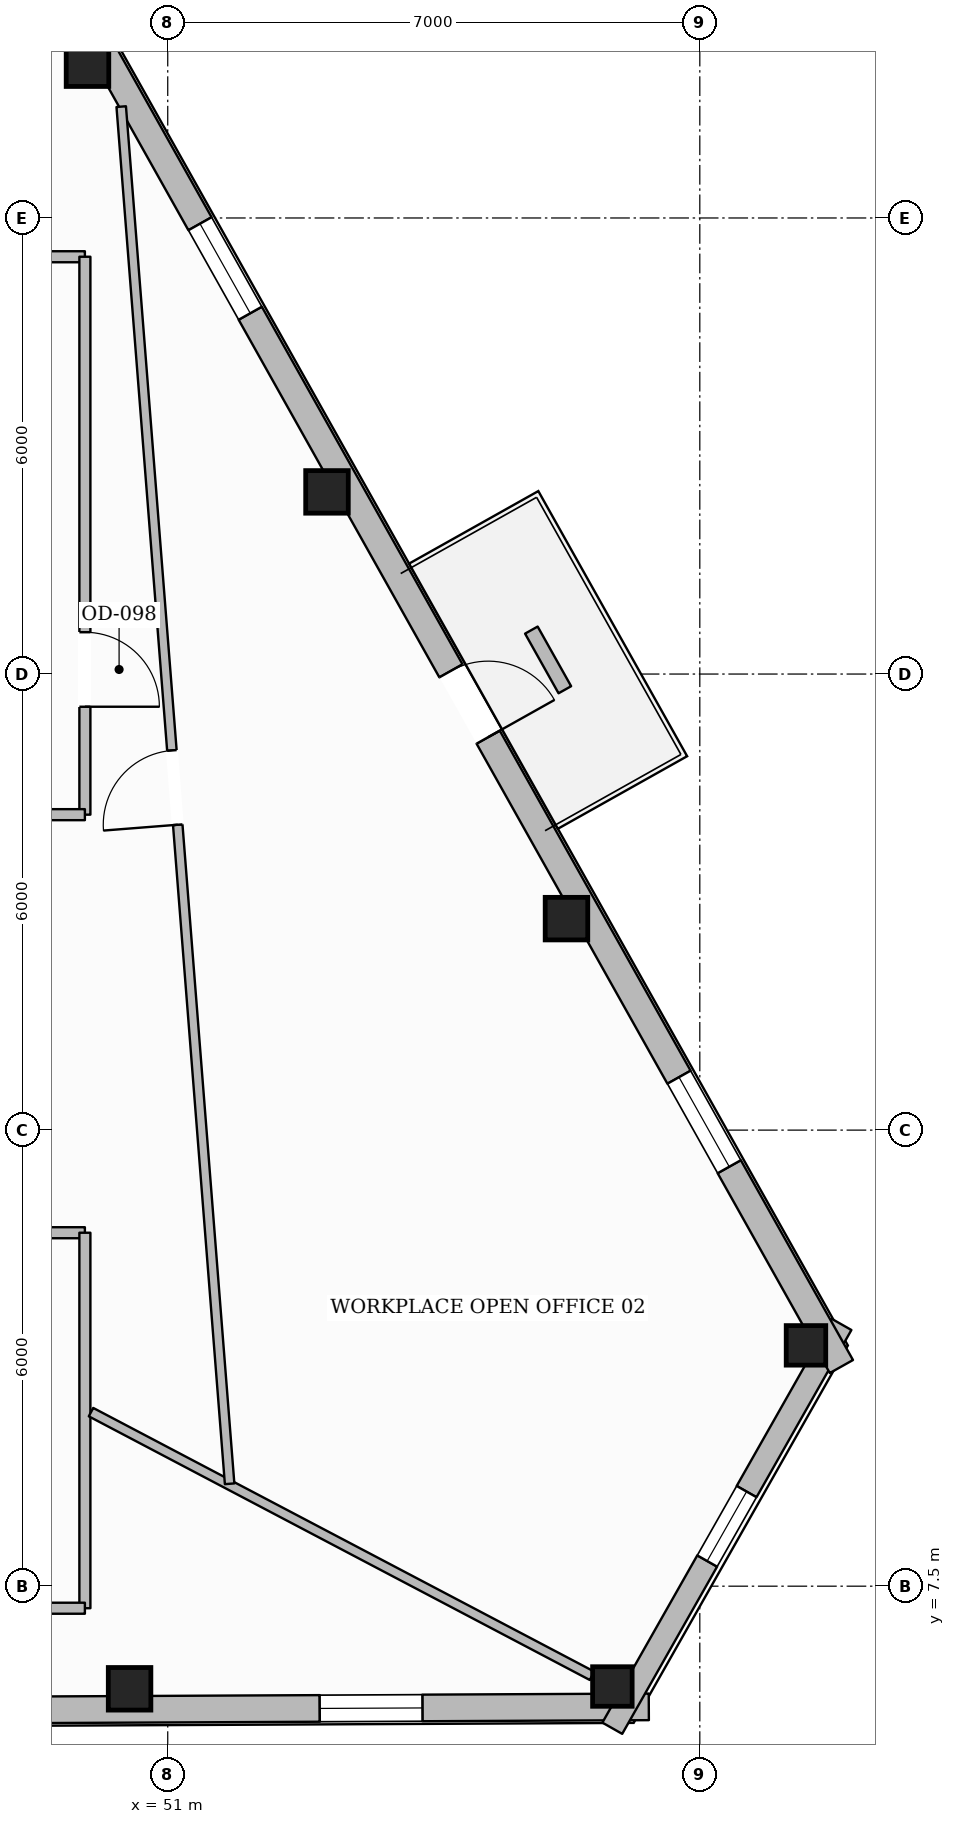
"""IFC4 building model, lengths in metres.
Left out: names, types, materials, properties, quantities, classifications, styles, units other than length and angle.
Written with IfcOpenShell. Run it as: python <this file> out.ifc"""

import sys

from ifc_helpers import new_model, si_unit, direction, frame, frame_2d, origin, origin_2d, place, context, subcontext, project, spatial, rectangle, hollow_rectangle, extrude, element, fill, save


model = new_model("IFC4")
c1 = context("Model", 3, precision=1e-05, world=origin(), true_north=direction((0.0, 1.0)))
c2 = subcontext(c1, "Body", "Model", "MODEL_VIEW")
j1 = project(units=[si_unit("LENGTHUNIT", "METRE"), si_unit("PLANEANGLEUNIT", "RADIAN")], contexts=[c1])
p1 = place(None, origin())
s1 = spatial("IfcSite", under=j1, at=p1, CompositionType="ELEMENT")
p2 = place(p1, origin())
s2 = spatial("IfcBuilding", under=s1, at=p2, CompositionType="ELEMENT")
p3 = place(p2, frame((0.0, 0.0, 301.1)))
s3 = spatial("IfcBuildingStorey", under=s2, at=p3, CompositionType="ELEMENT", Elevation=301.1)
p4 = place(p3, frame((50.498, 6.15, 0.0), z_axis=(0.0, 0.0, 1.0), x_axis=(1.0, 0.0, 0.0)))
e1 = element("IfcColumn", 1, at=p4, inside=s3, PredefinedType="COLUMN", context=c2, shape_type="SweptSolid", body=[
    extrude(hollow_rectangle(XDim=0.56, YDim=0.56, WallThickness=0.025, at=origin_2d()), origin(), (0.0, 0.0, 1.0), 3.635),
])
for number, where, z_axis, x_axis in (
    (2, (56.85, 6.18, 0.0), (0.0, 0.0, 1.0), (1.0, 0.0, 0.0)),
    (3, (59.397, 10.668, 0.0), (0.0, 0.0, 1.0), (1.0, 0.0, 0.0)),
):
    element("IfcColumn", number, at=place(p3, frame(where, z_axis=z_axis, x_axis=x_axis)), inside=s3, PredefinedType="COLUMN", context=c2, shape_type="SweptSolid", body=[
        extrude(hollow_rectangle(XDim=0.52, YDim=0.52, WallThickness=0.024, at=origin_2d()), origin(), (0.0, 0.0, 1.0), 3.635),
    ])
for number, where, z_axis, x_axis in (
    (4, (56.246, 16.282, 0.0), (0.0, 0.0, 1.0), (1.0, 0.0, 0.0)),
    (5, (53.095, 21.896, 0.0), (0.0, 0.0, 1.0), (1.0, 0.0, 0.0)),
    (6, (49.944, 27.51, 0.0), (0.0, 0.0, 1.0), (1.0, 0.0, 0.0)),
):
    element("IfcColumn", number, at=place(p3, frame(where, z_axis=z_axis, x_axis=x_axis)), inside=s3, PredefinedType="COLUMN", context=c2, shape_type="SweptSolid", body=[
        extrude(hollow_rectangle(XDim=0.56, YDim=0.56, WallThickness=0.025, at=origin_2d()), origin(), (0.0, 0.0, 1.0), 3.635),
    ])
p5 = place(p3, frame((57.329, 5.912, 0.0), z_axis=(0.0, 0.0, 1.0), x_axis=(-0.999988664308, -0.004761434209, 0.0)))
e7 = element("IfcWall", 7, at=p5, inside=s3, PredefinedType="STANDARD", context=c2, shape_type="SweptSolid", body=[
    extrude(rectangle(XDim=39.071, YDim=0.35, at=frame_2d((19.536, 0.0))), origin(), (0.0, 0.0, 1.0), 3.221),
])
p6 = place(p5, frame((28.703, 0.0, 0.0)))
e8 = element("IfcOpeningElement", 8, at=p6, cuts=e7, PredefinedType="OPENING", context=c2, shape_type="SweptSolid", body=[
    extrude(rectangle(XDim=1.0, YDim=2.2, at=frame_2d((0.5, 1.1))), frame((0.0, 0.185, 0.0), z_axis=(0.0, -1.0, 0.0), x_axis=(1.0, 0.0, 0.0)), (0.0, 0.0, 1.0), 0.37),
])
p7 = place(p5, frame((34.738, 0.0, 0.65)))
e9 = element("IfcOpeningElement", 9, at=p7, cuts=e7, PredefinedType="OPENING", context=c2, shape_type="SweptSolid", body=[
    extrude(rectangle(XDim=1.35, YDim=1.75, at=frame_2d((0.675, 0.875))), frame((0.0, 0.185, 0.0), z_axis=(0.0, -1.0, 0.0), x_axis=(1.0, 0.0, 0.0)), (0.0, 0.0, 1.0), 0.37),
])
p8 = place(p5, frame((22.034, 0.0, 0.65)))
e10 = element("IfcOpeningElement", 10, at=p8, cuts=e7, PredefinedType="OPENING", context=c2, shape_type="SweptSolid", body=[
    extrude(rectangle(XDim=1.35, YDim=1.75, at=frame_2d((0.675, 0.875))), frame((0.0, 0.185, 0.0), z_axis=(0.0, -1.0, 0.0), x_axis=(1.0, 0.0, 0.0)), (0.0, 0.0, 1.0), 0.37),
])
p9 = place(p5, frame((9.331, 0.0, 0.65)))
e11 = element("IfcOpeningElement", 11, at=p9, cuts=e7, PredefinedType="OPENING", context=c2, shape_type="SweptSolid", body=[
    extrude(rectangle(XDim=1.35, YDim=1.75, at=frame_2d((0.675, 0.875))), frame((0.0, 0.185, 0.0), z_axis=(0.0, -1.0, 0.0), x_axis=(1.0, 0.0, 0.0)), (0.0, 0.0, 1.0), 0.37),
])
p10 = place(p5, frame((2.979, 0.0, 0.65)))
e12 = element("IfcOpeningElement", 12, at=p10, cuts=e7, PredefinedType="OPENING", context=c2, shape_type="SweptSolid", body=[
    extrude(rectangle(XDim=1.35, YDim=1.75, at=frame_2d((0.675, 0.875))), frame((0.0, 0.185, 0.0), z_axis=(0.0, -1.0, 0.0), x_axis=(1.0, 0.0, 0.0)), (0.0, 0.0, 1.0), 0.37),
])
p11 = place(p3, frame((59.864, 10.944, 0.0), z_axis=(0.0, 0.0, 1.0), x_axis=(-0.493576110352, -0.869702606234, 0.0)))
e13 = element("IfcWall", 13, at=p11, inside=s3, PredefinedType="STANDARD", context=c2, shape_type="SweptSolid", body=[
    extrude(rectangle(XDim=6.109, YDim=0.3, at=frame_2d((3.055, 0.0))), origin(), (0.0, 0.0, 1.0), 3.221),
])
p12 = place(p11, frame((2.53, 0.0, 0.65)))
e14 = element("IfcOpeningElement", 14, at=p12, cuts=e13, PredefinedType="OPENING", context=c2, shape_type="SweptSolid", body=[
    extrude(rectangle(XDim=1.05, YDim=1.7, at=frame_2d((0.525, 0.85))), frame((0.0, 0.16, 0.0), z_axis=(0.0, -1.0, 0.0), x_axis=(1.0, 0.0, 0.0)), (0.0, 0.0, 1.0), 0.32),
])
p13 = place(p3, frame((40.491, 44.906, 0.0), z_axis=(0.0, 0.0, 1.0), x_axis=(0.489429021632, -0.872043136997, 0.0)))
e15 = element("IfcWall", 15, at=p13, inside=s3, PredefinedType="STANDARD", context=c2, shape_type="SweptSolid", body=[
    extrude(rectangle(XDim=39.581, YDim=0.35, at=frame_2d((19.79, 0.0))), origin(), (0.0, 0.0, 1.0), 3.221),
])
p14 = place(p13, frame((29.085, 0.0, 0.0)))
e16 = element("IfcOpeningElement", 16, at=p14, cuts=e15, PredefinedType="OPENING", context=c2, shape_type="SweptSolid", body=[
    extrude(rectangle(XDim=1.0, YDim=2.2, at=frame_2d((0.5, 1.1))), frame((0.0, 0.185, 0.0), z_axis=(0.0, -1.0, 0.0), x_axis=(1.0, 0.0, 0.0)), (0.0, 0.0, 1.0), 0.37),
])
p15 = place(p13, frame((35.216, 0.0, 0.65)))
e17 = element("IfcOpeningElement", 17, at=p15, cuts=e15, PredefinedType="OPENING", context=c2, shape_type="SweptSolid", body=[
    extrude(rectangle(XDim=1.35, YDim=1.75, at=frame_2d((0.675, 0.875))), frame((0.0, 0.185, 0.0), z_axis=(0.0, -1.0, 0.0), x_axis=(1.0, 0.0, 0.0)), (0.0, 0.0, 1.0), 0.37),
])
p16 = place(p13, frame((22.34, 0.0, 0.65)))
e18 = element("IfcOpeningElement", 18, at=p16, cuts=e15, PredefinedType="OPENING", context=c2, shape_type="SweptSolid", body=[
    extrude(rectangle(XDim=1.35, YDim=1.75, at=frame_2d((0.675, 0.875))), frame((0.0, 0.185, 0.0), z_axis=(0.0, -1.0, 0.0), x_axis=(1.0, 0.0, 0.0)), (0.0, 0.0, 1.0), 0.37),
])
p17 = place(p13, frame((9.464, 0.0, 0.65)))
e19 = element("IfcOpeningElement", 19, at=p17, cuts=e15, PredefinedType="OPENING", context=c2, shape_type="SweptSolid", body=[
    extrude(rectangle(XDim=1.35, YDim=1.75, at=frame_2d((0.675, 0.875))), frame((0.0, 0.185, 0.0), z_axis=(0.0, -1.0, 0.0), x_axis=(1.0, 0.0, 0.0)), (0.0, 0.0, 1.0), 0.37),
])
p18 = place(p13, frame((3.026, 0.0, 0.65)))
e20 = element("IfcOpeningElement", 20, at=p18, cuts=e15, PredefinedType="OPENING", context=c2, shape_type="SweptSolid", body=[
    extrude(rectangle(XDim=1.35, YDim=1.75, at=frame_2d((0.675, 0.875))), frame((0.0, 0.185, 0.0), z_axis=(0.0, -1.0, 0.0), x_axis=(1.0, 0.0, 0.0)), (0.0, 0.0, 1.0), 0.37),
])
p19 = place(p3, frame((56.224, 19.293, 0.0), z_axis=(0.0, 0.0, 1.0), x_axis=(-0.489462368995, 0.87202442015, 0.0)))
e21 = element("IfcWall", 21, at=p19, inside=s3, PredefinedType="USERDEFINED", context=c2, shape_type="SweptSolid", body=[
    extrude(rectangle(XDim=0.9, YDim=0.19, at=frame_2d((0.45, 0.0))), origin(), (0.0, 0.0, 1.0), 0.5),
])
p20 = place(p3, frame((45.2, 24.99, 0.0), z_axis=(0.0, 0.0, 1.0), x_axis=(1.0, 0.0, 0.0)))
e22 = element("IfcWall", 22, at=p20, inside=s3, PredefinedType="PARTITIONING", context=c2, shape_type="SweptSolid", body=[
    extrude(rectangle(XDim=4.71, YDim=0.145, at=frame_2d((2.355, 0.0))), origin(), (0.0, 0.0, 1.0), 3.635),
])
p21 = place(p3, frame((49.91, 24.99, 0.0), z_axis=(0.0, 0.0, 1.0), x_axis=(0.0, -1.0, 0.0)))
e23 = element("IfcWall", 23, at=p21, inside=s3, PredefinedType="PARTITIONING", context=c2, shape_type="SweptSolid", body=[
    extrude(rectangle(XDim=7.34, YDim=0.145, at=frame_2d((3.67, 0.0))), origin(), (0.0, 0.0, 1.0), 3.374),
])
p22 = place(p21, frame((4.94, 0.0, 0.0)))
e24 = element("IfcOpeningElement", 24, at=p22, cuts=e23, PredefinedType="OPENING", context=c2, shape_type="SweptSolid", body=[
    extrude(rectangle(XDim=0.98, YDim=2.15, at=frame_2d((0.49, 1.075))), frame((0.0, 0.083, 0.0), z_axis=(0.0, -1.0, 0.0), x_axis=(1.0, 0.0, 0.0)), (0.0, 0.0, 1.0), 0.165),
])
for number, where, z_axis, x_axis in (
    (25, (49.91, 17.65, 0.0), (0.0, 0.0, 1.0), (-1.0, 0.0, 0.0)),
    (26, (48.09, 12.15, 0.0), (0.0, 0.0, 1.0), (1.0, 0.0, 0.0)),
):
    element("IfcWall", number, at=place(p3, frame(where, z_axis=z_axis, x_axis=x_axis)), inside=s3, PredefinedType="PARTITIONING", context=c2, shape_type="SweptSolid", body=[
        extrude(rectangle(XDim=1.82, YDim=0.145, at=frame_2d((0.91, 0.0))), origin(), (0.0, 0.0, 1.0), 3.635),
    ])
p23 = place(p3, frame((49.91, 12.15, 0.0), z_axis=(0.0, 0.0, 1.0), x_axis=(0.0, -1.0, 0.0)))
e27 = element("IfcWall", 27, at=p23, inside=s3, PredefinedType="PARTITIONING", context=c2, shape_type="SweptSolid", body=[
    extrude(rectangle(XDim=4.94, YDim=0.145, at=frame_2d((2.47, 0.0))), origin(), (0.0, 0.0, 1.0), 3.635),
])
p24 = place(p3, frame((49.91, 7.21, 0.0), z_axis=(0.0, 0.0, 1.0), x_axis=(-1.0, 0.0, 0.0)))
e28 = element("IfcWall", 28, at=p24, inside=s3, PredefinedType="PARTITIONING", context=c2, shape_type="SweptSolid", body=[
    extrude(rectangle(XDim=23.82, YDim=0.145, at=frame_2d((11.91, 0.0))), origin(), (0.0, 0.0, 1.0), 3.374),
])
p25 = place(p24, frame((10.74, 0.0, 0.0)))
e29 = element("IfcOpeningElement", 29, at=p25, cuts=e28, PredefinedType="OPENING", context=c2, shape_type="SweptSolid", body=[
    extrude(rectangle(XDim=1.02, YDim=2.15, at=frame_2d((0.51, 1.075))), frame((0.0, 0.083, 0.0), z_axis=(0.0, -1.0, 0.0), x_axis=(1.0, 0.0, 0.0)), (0.0, 0.0, 1.0), 0.165),
])
p26 = place(p3, frame((49.99, 9.79, 0.0), z_axis=(0.0, 0.0, 1.0), x_axis=(0.884938130068, -0.465708606267, 0.0)))
e30 = element("IfcWall", 30, at=p26, inside=s3, PredefinedType="PARTITIONING", context=c2, shape_type="SweptSolid", body=[
    extrude(rectangle(XDim=7.448, YDim=0.125, at=frame_2d((3.724, 0.0))), origin(), (0.0, 0.0, 1.0), 3.271),
])
p27 = place(p3, frame((51.814, 8.847, 0.0), z_axis=(0.0, 0.0, 1.0), x_axis=(-0.078479740874, 0.99691570871, 0.0)))
e31 = element("IfcWall", 31, at=p27, inside=s3, PredefinedType="PARTITIONING", context=c2, shape_type="SweptSolid", body=[
    extrude(rectangle(XDim=18.174, YDim=0.125, at=frame_2d((9.087, 0.0))), origin(), (0.0, 0.0, 1.0), 3.224),
])
p28 = place(p27, frame((8.698, 0.0, 0.0)))
e32 = element("IfcOpeningElement", 32, at=p28, cuts=e31, PredefinedType="OPENING", context=c2, shape_type="SweptSolid", body=[
    extrude(rectangle(XDim=0.98, YDim=2.15, at=frame_2d((0.49, 1.075))), frame((0.0, 0.073, 0.0), z_axis=(0.0, -1.0, 0.0), x_axis=(1.0, 0.0, 0.0)), (0.0, 0.0, 1.0), 0.145),
])
p29 = place(p14, origin())
e33 = element("IfcDoor", 33, at=p29, inside=s3, OperationType="SINGLE_SWING_RIGHT", PredefinedType="DOOR", context=c2, shape_type="SweptSolid", body=[
    extrude(rectangle(XDim=1.0, YDim=2.2, at=frame_2d((0.5, 1.1))), frame((0.0, 0.025, 0.0), z_axis=(0.0, -1.0, 0.0), x_axis=(1.0, 0.0, 0.0)), (0.0, 0.0, 1.0), 0.05),
])
fill(e16, e33)
p30 = place(p10, origin())
e34 = element("IfcWindow", 34, at=p30, inside=s3, PartitioningType="SINGLE_PANEL", PredefinedType="WINDOW", context=c2, shape_type="SweptSolid", body=[
    extrude(rectangle(XDim=1.35, YDim=1.75, at=frame_2d((0.675, 0.875))), frame((0.0, 0.03, 0.0), z_axis=(0.0, -1.0, 0.0), x_axis=(1.0, 0.0, 0.0)), (0.0, 0.0, 1.0), 0.06),
])
fill(e12, e34)
p31 = place(p15, origin())
e35 = element("IfcWindow", 35, at=p31, inside=s3, PartitioningType="SINGLE_PANEL", PredefinedType="WINDOW", context=c2, shape_type="SweptSolid", body=[
    extrude(rectangle(XDim=1.35, YDim=1.75, at=frame_2d((0.675, 0.875))), frame((0.0, 0.03, 0.0), z_axis=(0.0, -1.0, 0.0), x_axis=(1.0, 0.0, 0.0)), (0.0, 0.0, 1.0), 0.06),
])
fill(e17, e35)
p32 = place(p16, origin())
e36 = element("IfcWindow", 36, at=p32, inside=s3, PartitioningType="SINGLE_PANEL", PredefinedType="WINDOW", context=c2, shape_type="SweptSolid", body=[
    extrude(rectangle(XDim=1.35, YDim=1.75, at=frame_2d((0.675, 0.875))), frame((0.0, 0.03, 0.0), z_axis=(0.0, -1.0, 0.0), x_axis=(1.0, 0.0, 0.0)), (0.0, 0.0, 1.0), 0.06),
])
fill(e18, e36)
p33 = place(p12, origin())
e37 = element("IfcWindow", 37, at=p33, inside=s3, PartitioningType="SINGLE_PANEL", PredefinedType="WINDOW", context=c2, shape_type="SweptSolid", body=[
    extrude(rectangle(XDim=1.05, YDim=1.7, at=frame_2d((0.525, 0.85))), frame((0.0, 0.03, 0.0), z_axis=(0.0, -1.0, 0.0), x_axis=(1.0, 0.0, 0.0)), (0.0, 0.0, 1.0), 0.06),
])
fill(e14, e37)
p34 = place(p22, origin())
e38 = element("IfcDoor", 38, at=p34, inside=s3, OperationType="SINGLE_SWING_RIGHT", PredefinedType="DOOR", context=c2, shape_type="SweptSolid", body=[
    extrude(rectangle(XDim=0.98, YDim=2.15, at=frame_2d((0.49, 1.075))), frame((0.0, 0.025, 0.0), z_axis=(0.0, -1.0, 0.0), x_axis=(1.0, 0.0, 0.0)), (0.0, 0.0, 1.0), 0.05),
])
fill(e24, e38)
p35 = place(p28, origin())
e39 = element("IfcDoor", 39, at=p35, inside=s3, OperationType="SINGLE_SWING_LEFT", PredefinedType="DOOR", context=c2, shape_type="SweptSolid", body=[
    extrude(rectangle(XDim=0.98, YDim=2.15, at=frame_2d((0.49, 1.075))), frame((0.0, 0.025, 0.0), z_axis=(0.0, -1.0, 0.0), x_axis=(1.0, 0.0, 0.0)), (0.0, 0.0, 1.0), 0.05),
])
fill(e32, e39)
save(model, sys.argv[1])
